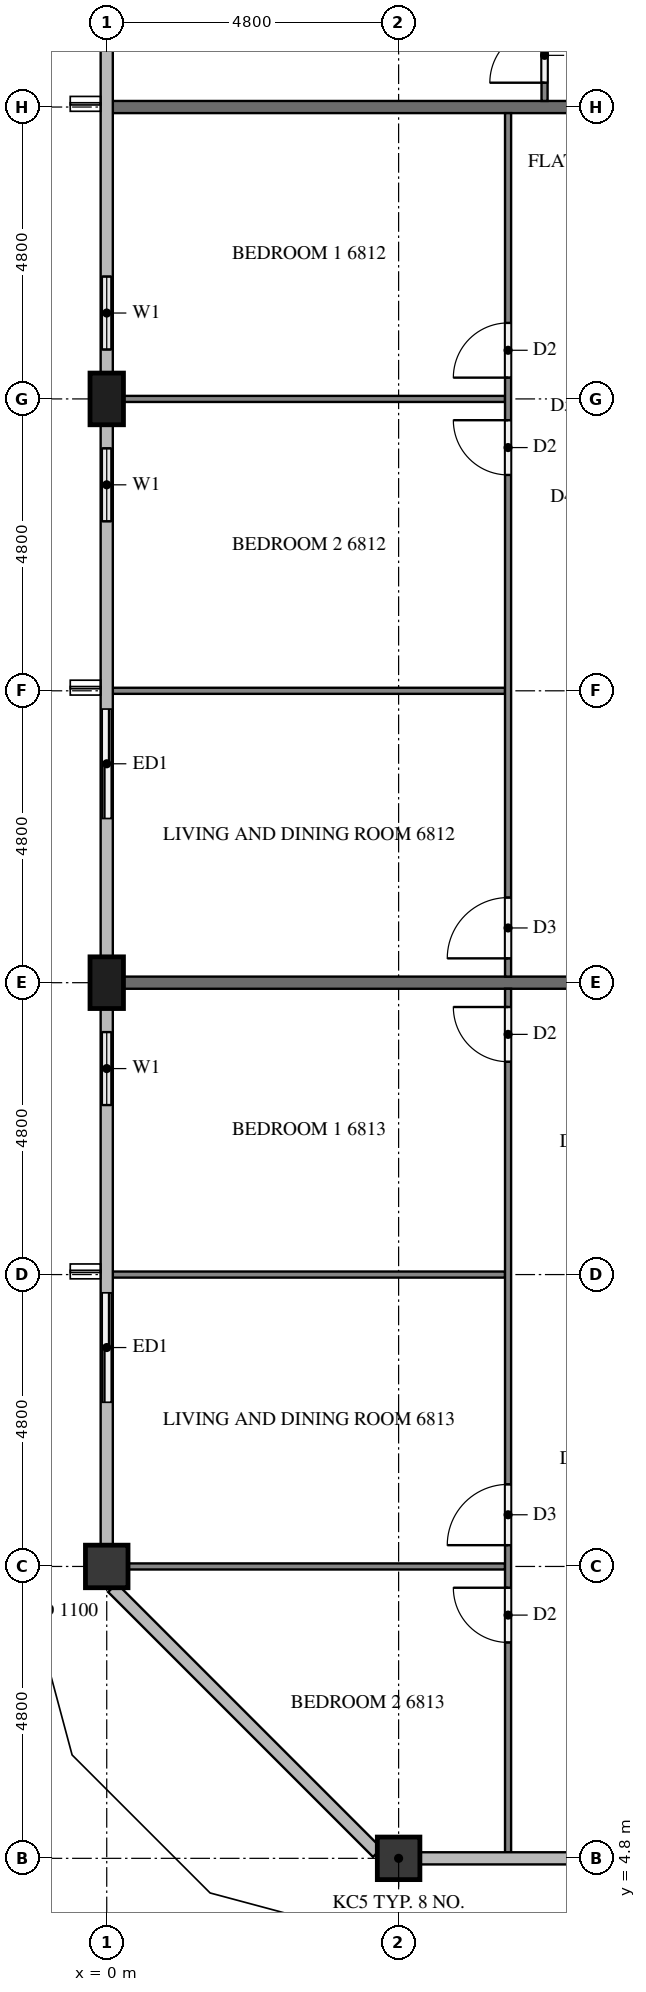
"""IFC4 building model, lengths in metres.
Left out: names, types, materials, properties, quantities, classifications, styles, units other than length and angle.
Written with IfcOpenShell. Run it as: python <this file> out.ifc"""

import sys

from ifc_helpers import new_model, si_unit, direction, frame, frame_2d, origin, origin_2d, place, context, subcontext, project, spatial, rectangle, extrude, element, fill, save


model = new_model("IFC4")
c1 = context("Model", 3, precision=1e-05, world=origin(), true_north=direction((0.0, 1.0)))
c2 = subcontext(c1, "Body", "Model", "MODEL_VIEW")
j1 = project(units=[si_unit("LENGTHUNIT", "METRE"), si_unit("PLANEANGLEUNIT", "RADIAN")], contexts=[c1])
p1 = place(None, origin())
s1 = spatial("IfcSite", under=j1, at=p1, CompositionType="ELEMENT")
p2 = place(p1, origin())
s2 = spatial("IfcBuilding", under=s1, at=p2, CompositionType="ELEMENT")
p3 = place(p2, frame((0.0, 0.0, 259.7)))
s3 = spatial("IfcBuildingStorey", under=s2, at=p3, CompositionType="ELEMENT", Elevation=259.7)
p4 = place(p3, frame((4.8, 4.8, 0.0), z_axis=(0.0, 0.0, 1.0), x_axis=(1.0, 0.0, 0.0)))
e1 = element("IfcColumn", 1, at=p4, inside=s3, PredefinedType="COLUMN", context=c2, shape_type="SweptSolid", body=[
    extrude(rectangle(XDim=0.7, YDim=0.7, at=origin_2d()), origin(), (0.0, 0.0, 1.0), 3.1),
])
for number, where, z_axis, x_axis in (
    (2, (0.0, 28.8, 0.0), (0.0, 0.0, 1.0), (0.0, 1.0, 0.0)),
    (3, (0.0, 19.2, 0.0), (0.0, 0.0, 1.0), (0.0, 1.0, 0.0)),
):
    element("IfcColumn", number, at=place(p3, frame(where, z_axis=z_axis, x_axis=x_axis)), inside=s3, PredefinedType="COLUMN", context=c2, shape_type="SweptSolid", body=[
        extrude(rectangle(XDim=0.85, YDim=0.55, at=origin_2d()), origin(), (0.0, 0.0, 1.0), 3.1),
    ])
p5 = place(p3, frame((0.0, 9.6, 0.0), z_axis=(0.0, 0.0, 1.0), x_axis=(1.0, 0.0, 0.0)))
e4 = element("IfcColumn", 4, at=p5, inside=s3, PredefinedType="COLUMN", context=c2, shape_type="SweptSolid", body=[
    extrude(rectangle(XDim=0.7, YDim=0.7, at=origin_2d()), origin(), (0.0, 0.0, 1.0), 3.1),
])
p6 = place(p3, frame((0.0, 31.2, 0.0), z_axis=(0.0, 0.0, 1.0), x_axis=(0.0, -1.0, 0.0)))
e5 = element("IfcWall", 5, at=p6, inside=s3, PredefinedType="SOLIDWALL", context=c2, shape_type="SweptSolid", body=[
    extrude(rectangle(XDim=1.975, YDim=0.15, at=frame_2d((0.987, 0.0))), origin(), (0.0, 0.0, 1.0), 3.1),
])
p7 = place(p6, frame((0.387, 0.0, 0.9)))
e6 = element("IfcOpeningElement", 6, at=p7, cuts=e5, PredefinedType="OPENING", context=c2, shape_type="SweptSolid", body=[
    extrude(rectangle(XDim=1.2, YDim=1.4, at=frame_2d((0.6, 0.7))), frame((0.0, 0.085, 0.0), z_axis=(0.0, -1.0, 0.0), x_axis=(1.0, 0.0, 0.0)), (0.0, 0.0, 1.0), 0.17),
])
p8 = place(p3, frame((0.0, 28.375, 0.0), z_axis=(0.0, 0.0, 1.0), x_axis=(0.0, -1.0, 0.0)))
e7 = element("IfcWall", 7, at=p8, inside=s3, PredefinedType="SOLIDWALL", context=c2, shape_type="SweptSolid", body=[
    extrude(rectangle(XDim=1.975, YDim=0.15, at=frame_2d((0.988, 0.0))), origin(), (0.0, 0.0, 1.0), 3.1),
])
p9 = place(p8, frame((0.387, 0.0, 0.9)))
e8 = element("IfcOpeningElement", 8, at=p9, cuts=e7, PredefinedType="OPENING", context=c2, shape_type="SweptSolid", body=[
    extrude(rectangle(XDim=1.2, YDim=1.4, at=frame_2d((0.6, 0.7))), frame((0.0, 0.085, 0.0), z_axis=(0.0, -1.0, 0.0), x_axis=(1.0, 0.0, 0.0)), (0.0, 0.0, 1.0), 0.17),
])
p10 = place(p3, frame((0.0, 24.0, 0.0), z_axis=(0.0, 0.0, 1.0), x_axis=(0.0, -1.0, 0.0)))
e9 = element("IfcWall", 9, at=p10, inside=s3, PredefinedType="SOLIDWALL", context=c2, shape_type="SweptSolid", body=[
    extrude(rectangle(XDim=2.4, YDim=0.15, at=frame_2d((1.2, 0.0))), origin(), (0.0, 0.0, 1.0), 3.1),
])
p11 = place(p10, frame((0.3, 0.0, 0.0)))
e10 = element("IfcOpeningElement", 10, at=p11, cuts=e9, PredefinedType="OPENING", context=c2, shape_type="SweptSolid", body=[
    extrude(rectangle(XDim=1.8, YDim=2.4, at=frame_2d((0.9, 1.2))), frame((0.0, 0.085, 0.0), z_axis=(0.0, -1.0, 0.0), x_axis=(1.0, 0.0, 0.0)), (0.0, 0.0, 1.0), 0.17),
])
p12 = place(p3, frame((0.0, 18.775, 0.0), z_axis=(0.0, 0.0, 1.0), x_axis=(0.0, -1.0, 0.0)))
e11 = element("IfcWall", 11, at=p12, inside=s3, PredefinedType="SOLIDWALL", context=c2, shape_type="SweptSolid", body=[
    extrude(rectangle(XDim=1.975, YDim=0.15, at=frame_2d((0.987, 0.0))), origin(), (0.0, 0.0, 1.0), 3.1),
])
p13 = place(p12, frame((0.387, 0.0, 0.9)))
e12 = element("IfcOpeningElement", 12, at=p13, cuts=e11, PredefinedType="OPENING", context=c2, shape_type="SweptSolid", body=[
    extrude(rectangle(XDim=1.2, YDim=1.4, at=frame_2d((0.6, 0.7))), frame((0.0, 0.085, 0.0), z_axis=(0.0, -1.0, 0.0), x_axis=(1.0, 0.0, 0.0)), (0.0, 0.0, 1.0), 0.17),
])
p14 = place(p3, frame((0.0, 14.4, 0.0), z_axis=(0.0, 0.0, 1.0), x_axis=(0.0, -1.0, 0.0)))
e13 = element("IfcWall", 13, at=p14, inside=s3, PredefinedType="SOLIDWALL", context=c2, shape_type="SweptSolid", body=[
    extrude(rectangle(XDim=2.4, YDim=0.15, at=frame_2d((1.2, 0.0))), origin(), (0.0, 0.0, 1.0), 3.1),
])
p15 = place(p14, frame((0.3, 0.0, 0.0)))
e14 = element("IfcOpeningElement", 14, at=p15, cuts=e13, PredefinedType="OPENING", context=c2, shape_type="SweptSolid", body=[
    extrude(rectangle(XDim=1.8, YDim=2.4, at=frame_2d((0.9, 1.2))), frame((0.0, 0.085, 0.0), z_axis=(0.0, -1.0, 0.0), x_axis=(1.0, 0.0, 0.0)), (0.0, 0.0, 1.0), 0.17),
])
p16 = place(p3, frame((0.1, 33.6, 0.0), z_axis=(0.0, 0.0, 1.0), x_axis=(1.0, 0.0, 0.0)))
e15 = element("IfcWall", 15, at=p16, inside=s3, PredefinedType="PARTITIONING", context=c2, shape_type="SweptSolid", body=[
    extrude(rectangle(XDim=11.8, YDim=0.2, at=frame_2d((5.9, 0.0))), origin(), (0.0, 0.0, 1.0), 3.1),
])
p17 = place(p3, frame((0.275, 19.2, 0.0), z_axis=(0.0, 0.0, 1.0), x_axis=(1.0, 0.0, 0.0)))
e16 = element("IfcWall", 16, at=p17, inside=s3, PredefinedType="PARTITIONING", context=c2, shape_type="SweptSolid", body=[
    extrude(rectangle(XDim=11.625, YDim=0.2, at=frame_2d((5.812, 0.0))), origin(), (0.0, 0.0, 1.0), 3.1),
])
p18 = place(p3, frame((7.2, 33.7, 0.0), z_axis=(0.0, 0.0, 1.0), x_axis=(0.0, 1.0, 0.0)))
e17 = element("IfcWall", 17, at=p18, inside=s3, PredefinedType="PARTITIONING", context=c2, shape_type="SweptSolid", body=[
    extrude(rectangle(XDim=19.0, YDim=0.1, at=frame_2d((9.5, 0.0))), origin(), (0.0, 0.0, 1.0), 3.1),
])
p19 = place(p18, frame((0.3, 0.0, 0.0)))
e18 = element("IfcOpeningElement", 18, at=p19, cuts=e17, PredefinedType="OPENING", context=c2, shape_type="SweptSolid", body=[
    extrude(rectangle(XDim=0.9, YDim=2.1, at=frame_2d((0.45, 1.05))), frame((0.0, 0.06, 0.0), z_axis=(0.0, -1.0, 0.0), x_axis=(1.0, 0.0, 0.0)), (0.0, 0.0, 1.0), 0.12),
])
p20 = place(p18, frame((8.25, 0.0, 0.0)))
e19 = element("IfcOpeningElement", 19, at=p20, cuts=e17, PredefinedType="OPENING", context=c2, shape_type="SweptSolid", body=[
    extrude(rectangle(XDim=0.9, YDim=2.1, at=frame_2d((0.45, 1.05))), frame((0.0, 0.06, 0.0), z_axis=(0.0, -1.0, 0.0), x_axis=(1.0, 0.0, 0.0)), (0.0, 0.0, 1.0), 0.12),
])
p21 = place(p18, frame((9.85, 0.0, 0.0)))
e20 = element("IfcOpeningElement", 20, at=p21, cuts=e17, PredefinedType="OPENING", context=c2, shape_type="SweptSolid", body=[
    extrude(rectangle(XDim=1.0, YDim=2.1, at=frame_2d((0.5, 1.05))), frame((0.0, 0.06, 0.0), z_axis=(0.0, -1.0, 0.0), x_axis=(1.0, 0.0, 0.0)), (0.0, 0.0, 1.0), 0.12),
])
p22 = place(p18, frame((17.8, 0.0, 0.0)))
e21 = element("IfcOpeningElement", 21, at=p22, cuts=e17, PredefinedType="OPENING", context=c2, shape_type="SweptSolid", body=[
    extrude(rectangle(XDim=0.9, YDim=2.1, at=frame_2d((0.45, 1.05))), frame((0.0, 0.06, 0.0), z_axis=(0.0, -1.0, 0.0), x_axis=(1.0, 0.0, 0.0)), (0.0, 0.0, 1.0), 0.12),
])
p23 = place(p3, frame((6.55, 28.8, 0.0), z_axis=(0.0, 0.0, 1.0), x_axis=(-1.0, 0.0, 0.0)))
e22 = element("IfcWall", 22, at=p23, inside=s3, PredefinedType="PARTITIONING", context=c2, shape_type="SweptSolid", body=[
    extrude(rectangle(XDim=6.275, YDim=0.1, at=frame_2d((3.138, 0.0))), origin(), (0.0, 0.0, 1.0), 3.1),
])
p24 = place(p3, frame((6.55, 24.0, 0.0), z_axis=(0.0, 0.0, 1.0), x_axis=(-1.0, 0.0, 0.0)))
e23 = element("IfcWall", 23, at=p24, inside=s3, PredefinedType="PARTITIONING", context=c2, shape_type="SweptSolid", body=[
    extrude(rectangle(XDim=6.45, YDim=0.1, at=frame_2d((3.225, 0.0))), origin(), (0.0, 0.0, 1.0), 3.1),
])
p25 = place(p3, frame((6.6, 19.3, 0.0), z_axis=(0.0, 0.0, 1.0), x_axis=(0.0, 1.0, 0.0)))
e24 = element("IfcWall", 24, at=p25, inside=s3, PredefinedType="PARTITIONING", context=c2, shape_type="SweptSolid", body=[
    extrude(rectangle(XDim=14.2, YDim=0.1, at=frame_2d((7.1, 0.0))), origin(), (0.0, 0.0, 1.0), 3.1),
])
p26 = place(p25, frame((9.85, 0.0, 0.0)))
e25 = element("IfcOpeningElement", 25, at=p26, cuts=e24, PredefinedType="OPENING", context=c2, shape_type="SweptSolid", body=[
    extrude(rectangle(XDim=0.9, YDim=2.1, at=frame_2d((0.45, 1.05))), frame((0.0, 0.06, 0.0), z_axis=(0.0, -1.0, 0.0), x_axis=(1.0, 0.0, 0.0)), (0.0, 0.0, 1.0), 0.12),
])
p27 = place(p25, frame((8.25, 0.0, 0.0)))
e26 = element("IfcOpeningElement", 26, at=p27, cuts=e24, PredefinedType="OPENING", context=c2, shape_type="SweptSolid", body=[
    extrude(rectangle(XDim=0.9, YDim=2.1, at=frame_2d((0.45, 1.05))), frame((0.0, 0.06, 0.0), z_axis=(0.0, -1.0, 0.0), x_axis=(1.0, 0.0, 0.0)), (0.0, 0.0, 1.0), 0.12),
])
p28 = place(p25, frame((0.3, 0.0, 0.0)))
e27 = element("IfcOpeningElement", 27, at=p28, cuts=e24, PredefinedType="OPENING", context=c2, shape_type="SweptSolid", body=[
    extrude(rectangle(XDim=1.0, YDim=2.1, at=frame_2d((0.5, 1.05))), frame((0.0, 0.06, 0.0), z_axis=(0.0, -1.0, 0.0), x_axis=(1.0, 0.0, 0.0)), (0.0, 0.0, 1.0), 0.12),
])
p29 = place(p3, frame((6.55, 14.4, 0.0), z_axis=(0.0, 0.0, 1.0), x_axis=(-1.0, 0.0, 0.0)))
e28 = element("IfcWall", 28, at=p29, inside=s3, PredefinedType="PARTITIONING", context=c2, shape_type="SweptSolid", body=[
    extrude(rectangle(XDim=6.45, YDim=0.1, at=frame_2d((3.225, 0.0))), origin(), (0.0, 0.0, 1.0), 3.1),
])
p30 = place(p3, frame((6.55, 9.6, 0.0), z_axis=(0.0, 0.0, 1.0), x_axis=(-1.0, 0.0, 0.0)))
e29 = element("IfcWall", 29, at=p30, inside=s3, PredefinedType="PARTITIONING", context=c2, shape_type="SweptSolid", body=[
    extrude(rectangle(XDim=6.2, YDim=0.1, at=frame_2d((3.1, 0.0))), origin(), (0.0, 0.0, 1.0), 3.1),
])
p31 = place(p3, frame((6.6, 4.9, 0.0), z_axis=(0.0, 0.0, 1.0), x_axis=(0.0, 1.0, 0.0)))
e30 = element("IfcWall", 30, at=p31, inside=s3, PredefinedType="PARTITIONING", context=c2, shape_type="SweptSolid", body=[
    extrude(rectangle(XDim=14.2, YDim=0.1, at=frame_2d((7.1, 0.0))), origin(), (0.0, 0.0, 1.0), 3.1),
])
p32 = place(p31, frame((13.0, 0.0, 0.0)))
e31 = element("IfcOpeningElement", 31, at=p32, cuts=e30, PredefinedType="OPENING", context=c2, shape_type="SweptSolid", body=[
    extrude(rectangle(XDim=0.9, YDim=2.1, at=frame_2d((0.45, 1.05))), frame((0.0, 0.06, 0.0), z_axis=(0.0, -1.0, 0.0), x_axis=(1.0, 0.0, 0.0)), (0.0, 0.0, 1.0), 0.12),
])
p33 = place(p31, frame((5.05, 0.0, 0.0)))
e32 = element("IfcOpeningElement", 32, at=p33, cuts=e30, PredefinedType="OPENING", context=c2, shape_type="SweptSolid", body=[
    extrude(rectangle(XDim=1.0, YDim=2.1, at=frame_2d((0.5, 1.05))), frame((0.0, 0.06, 0.0), z_axis=(0.0, -1.0, 0.0), x_axis=(1.0, 0.0, 0.0)), (0.0, 0.0, 1.0), 0.12),
])
p34 = place(p31, frame((3.45, 0.0, 0.0)))
e33 = element("IfcOpeningElement", 33, at=p34, cuts=e30, PredefinedType="OPENING", context=c2, shape_type="SweptSolid", body=[
    extrude(rectangle(XDim=0.9, YDim=2.1, at=frame_2d((0.45, 1.05))), frame((0.0, 0.06, 0.0), z_axis=(0.0, -1.0, 0.0), x_axis=(1.0, 0.0, 0.0)), (0.0, 0.0, 1.0), 0.12),
])
p35 = place(p7, origin())
e34 = element("IfcWindow", 34, at=p35, inside=s3, PartitioningType="SINGLE_PANEL", PredefinedType="WINDOW", context=c2, shape_type="SweptSolid", body=[
    extrude(rectangle(XDim=1.2, YDim=1.4, at=frame_2d((0.6, 0.7))), frame((0.0, 0.03, 0.0), z_axis=(0.0, -1.0, 0.0), x_axis=(1.0, 0.0, 0.0)), (0.0, 0.0, 1.0), 0.06),
])
fill(e6, e34)
p36 = place(p9, origin())
e35 = element("IfcWindow", 35, at=p36, inside=s3, PartitioningType="SINGLE_PANEL", PredefinedType="WINDOW", context=c2, shape_type="SweptSolid", body=[
    extrude(rectangle(XDim=1.2, YDim=1.4, at=frame_2d((0.6, 0.7))), frame((0.0, 0.03, 0.0), z_axis=(0.0, -1.0, 0.0), x_axis=(1.0, 0.0, 0.0)), (0.0, 0.0, 1.0), 0.06),
])
fill(e8, e35)
p37 = place(p11, origin())
e36 = element("IfcDoor", 36, at=p37, inside=s3, OperationType="SLIDING_TO_LEFT", PredefinedType="DOOR", context=c2, shape_type="SweptSolid", body=[
    extrude(rectangle(XDim=1.8, YDim=2.4, at=frame_2d((0.9, 1.2))), frame((0.0, 0.025, 0.0), z_axis=(0.0, -1.0, 0.0), x_axis=(1.0, 0.0, 0.0)), (0.0, 0.0, 1.0), 0.05),
])
fill(e10, e36)
p38 = place(p13, origin())
e37 = element("IfcWindow", 37, at=p38, inside=s3, PartitioningType="SINGLE_PANEL", PredefinedType="WINDOW", context=c2, shape_type="SweptSolid", body=[
    extrude(rectangle(XDim=1.2, YDim=1.4, at=frame_2d((0.6, 0.7))), frame((0.0, 0.03, 0.0), z_axis=(0.0, -1.0, 0.0), x_axis=(1.0, 0.0, 0.0)), (0.0, 0.0, 1.0), 0.06),
])
fill(e12, e37)
p39 = place(p15, origin())
e38 = element("IfcDoor", 38, at=p39, inside=s3, OperationType="SLIDING_TO_RIGHT", PredefinedType="DOOR", context=c2, shape_type="SweptSolid", body=[
    extrude(rectangle(XDim=1.8, YDim=2.4, at=frame_2d((0.9, 1.2))), frame((0.0, 0.025, 0.0), z_axis=(0.0, -1.0, 0.0), x_axis=(1.0, 0.0, 0.0)), (0.0, 0.0, 1.0), 0.05),
])
fill(e14, e38)
p40 = place(p19, origin())
e39 = element("IfcDoor", 39, at=p40, inside=s3, OperationType="SINGLE_SWING_LEFT", PredefinedType="DOOR", context=c2, shape_type="SweptSolid", body=[
    extrude(rectangle(XDim=0.9, YDim=2.1, at=frame_2d((0.45, 1.05))), frame((0.0, 0.025, 0.0), z_axis=(0.0, -1.0, 0.0), x_axis=(1.0, 0.0, 0.0)), (0.0, 0.0, 1.0), 0.05),
])
fill(e18, e39)
p41 = place(p26, origin())
e40 = element("IfcDoor", 40, at=p41, inside=s3, OperationType="SINGLE_SWING_LEFT", PredefinedType="DOOR", context=c2, shape_type="SweptSolid", body=[
    extrude(rectangle(XDim=0.9, YDim=2.1, at=frame_2d((0.45, 1.05))), frame((0.0, 0.025, 0.0), z_axis=(0.0, -1.0, 0.0), x_axis=(1.0, 0.0, 0.0)), (0.0, 0.0, 1.0), 0.05),
])
fill(e25, e40)
p42 = place(p27, origin())
e41 = element("IfcDoor", 41, at=p42, inside=s3, OperationType="SINGLE_SWING_RIGHT", PredefinedType="DOOR", context=c2, shape_type="SweptSolid", body=[
    extrude(rectangle(XDim=0.9, YDim=2.1, at=frame_2d((0.45, 1.05))), frame((0.0, 0.025, 0.0), z_axis=(0.0, -1.0, 0.0), x_axis=(1.0, 0.0, 0.0)), (0.0, 0.0, 1.0), 0.05),
])
fill(e26, e41)
p43 = place(p28, origin())
e42 = element("IfcDoor", 42, at=p43, inside=s3, OperationType="SINGLE_SWING_LEFT", PredefinedType="DOOR", context=c2, shape_type="SweptSolid", body=[
    extrude(rectangle(XDim=1.0, YDim=2.1, at=frame_2d((0.5, 1.05))), frame((0.0, 0.025, 0.0), z_axis=(0.0, -1.0, 0.0), x_axis=(1.0, 0.0, 0.0)), (0.0, 0.0, 1.0), 0.05),
])
fill(e27, e42)
p44 = place(p32, origin())
e43 = element("IfcDoor", 43, at=p44, inside=s3, OperationType="SINGLE_SWING_RIGHT", PredefinedType="DOOR", context=c2, shape_type="SweptSolid", body=[
    extrude(rectangle(XDim=0.9, YDim=2.1, at=frame_2d((0.45, 1.05))), frame((0.0, 0.025, 0.0), z_axis=(0.0, -1.0, 0.0), x_axis=(1.0, 0.0, 0.0)), (0.0, 0.0, 1.0), 0.05),
])
fill(e31, e43)
p45 = place(p33, origin())
e44 = element("IfcDoor", 44, at=p45, inside=s3, OperationType="SINGLE_SWING_LEFT", PredefinedType="DOOR", context=c2, shape_type="SweptSolid", body=[
    extrude(rectangle(XDim=1.0, YDim=2.1, at=frame_2d((0.5, 1.05))), frame((0.0, 0.025, 0.0), z_axis=(0.0, -1.0, 0.0), x_axis=(1.0, 0.0, 0.0)), (0.0, 0.0, 1.0), 0.05),
])
fill(e32, e44)
p46 = place(p34, origin())
e45 = element("IfcDoor", 45, at=p46, inside=s3, OperationType="SINGLE_SWING_RIGHT", PredefinedType="DOOR", context=c2, shape_type="SweptSolid", body=[
    extrude(rectangle(XDim=0.9, YDim=2.1, at=frame_2d((0.45, 1.05))), frame((0.0, 0.025, 0.0), z_axis=(0.0, -1.0, 0.0), x_axis=(1.0, 0.0, 0.0)), (0.0, 0.0, 1.0), 0.05),
])
fill(e33, e45)
save(model, sys.argv[1])
